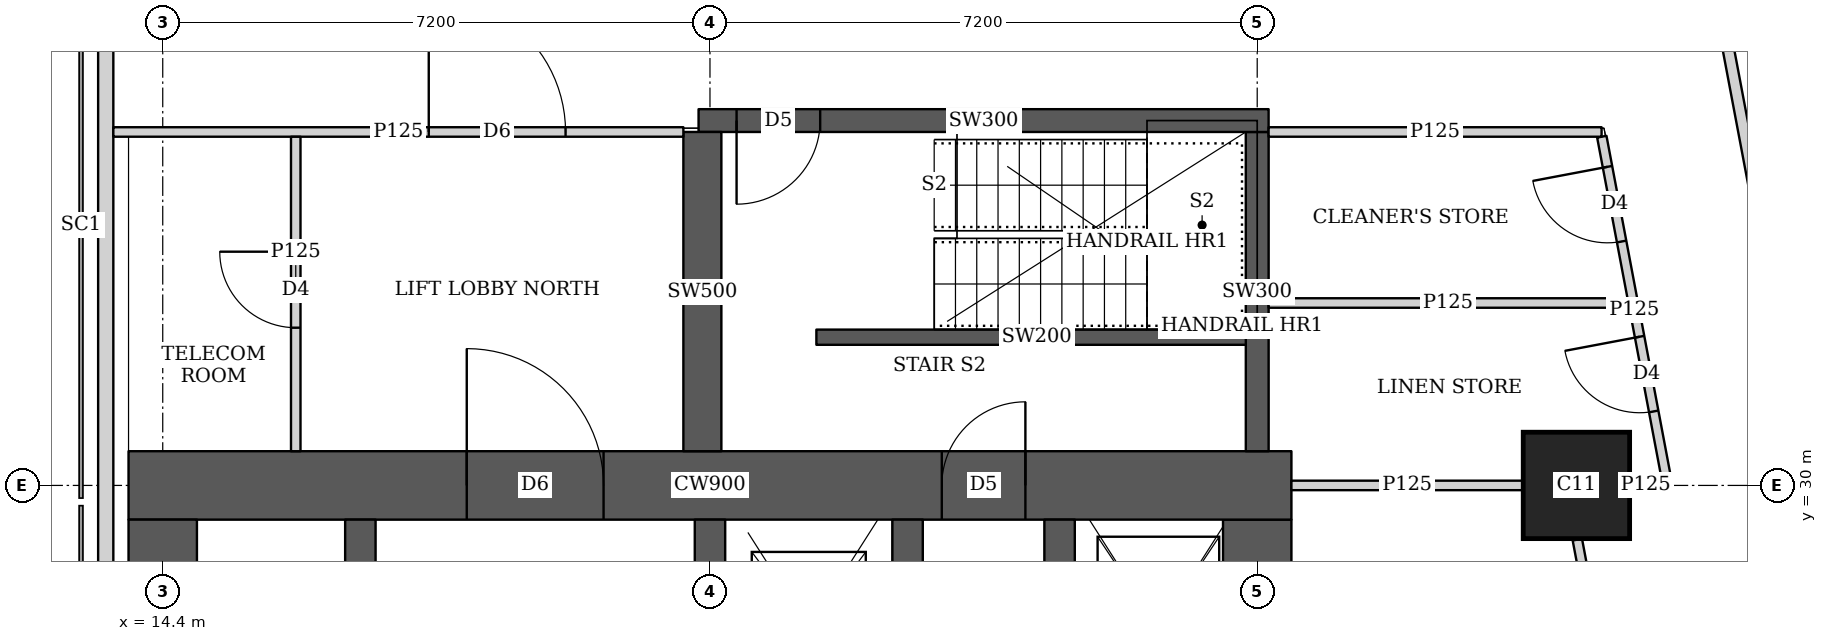
"""IFC4 building model, lengths in metres.
Left out: names, types, materials, properties, quantities, classifications, styles, units other than length and angle.
Written with IfcOpenShell. Run it as: python <this file> out.ifc"""

import sys

from ifc_helpers import new_model, si_unit, direction, frame, frame_2d, origin, origin_2d, place, context, subcontext, project, spatial, rectangle, extrude, element, fill, save


model = new_model("IFC4")
c1 = context("Model", 3, precision=1e-05, world=origin(), true_north=direction((0.0, 1.0)))
c2 = subcontext(c1, "Body", "Model", "MODEL_VIEW")
j1 = project(units=[si_unit("LENGTHUNIT", "METRE"), si_unit("PLANEANGLEUNIT", "RADIAN")], contexts=[c1])
p1 = place(None, origin())
s1 = spatial("IfcSite", under=j1, at=p1, CompositionType="ELEMENT")
p2 = place(p1, origin())
s2 = spatial("IfcBuilding", under=s1, at=p2, CompositionType="ELEMENT")
p3 = place(p2, frame((0.0, 0.0, 227.45)))
s3 = spatial("IfcBuildingStorey", under=s2, at=p3, CompositionType="ELEMENT", Elevation=227.45)
p4 = place(p3, frame((33.0, 30.0, 0.0), z_axis=(0.0, 0.0, 1.0), x_axis=(1.0, 0.0, 0.0)))
e1 = element("IfcColumn", 1, at=p4, inside=s3, PredefinedType="COLUMN", context=c2, shape_type="SweptSolid", body=[
    extrude(rectangle(XDim=1.4, YDim=1.4, at=origin_2d()), origin(), (0.0, 0.0, 1.0), 3.75),
])
p5 = place(p3, frame((13.95, 30.0, 0.0), z_axis=(0.0, 0.0, 1.0), x_axis=(1.0, 0.0, 0.0)))
e2 = element("IfcWall", 2, at=p5, inside=s3, PredefinedType="SHEAR", context=c2, shape_type="SweptSolid", body=[
    extrude(rectangle(XDim=15.3, YDim=0.9, at=frame_2d((7.65, 0.0))), origin(), (0.0, 0.0, 1.0), 3.75),
])
p6 = place(p5, frame((4.45, 0.0, 0.0)))
e3 = element("IfcOpeningElement", 3, at=p6, cuts=e2, PredefinedType="OPENING", context=c2, shape_type="SweptSolid", body=[
    extrude(rectangle(XDim=1.8, YDim=2.1, at=frame_2d((0.9, 1.05))), frame((0.0, 0.46, 0.0), z_axis=(0.0, -1.0, 0.0), x_axis=(1.0, 0.0, 0.0)), (0.0, 0.0, 1.0), 0.92),
])
p7 = place(p5, frame((10.7, 0.0, 0.0)))
e4 = element("IfcOpeningElement", 4, at=p7, cuts=e2, PredefinedType="OPENING", context=c2, shape_type="SweptSolid", body=[
    extrude(rectangle(XDim=1.1, YDim=2.1, at=frame_2d((0.55, 1.05))), frame((0.0, 0.46, 0.0), z_axis=(0.0, -1.0, 0.0), x_axis=(1.0, 0.0, 0.0)), (0.0, 0.0, 1.0), 0.92),
])
for number, where, z_axis, x_axis in (
    (5, (14.4, 15.45, 0.0), (0.0, 0.0, 1.0), (0.0, 1.0, 0.0)),
    (6, (28.8, 15.45, 0.0), (0.0, 0.0, 1.0), (0.0, 1.0, 0.0)),
):
    element("IfcWall", number, at=place(p3, frame(where, z_axis=z_axis, x_axis=x_axis)), inside=s3, PredefinedType="SHEAR", context=c2, shape_type="SweptSolid", body=[
        extrude(rectangle(XDim=14.1, YDim=0.9, at=frame_2d((7.05, 0.0))), origin(), (0.0, 0.0, 1.0), 3.75),
    ])
p8 = place(p3, frame((17.0, 15.45, 0.0), z_axis=(0.0, 0.0, 1.0), x_axis=(0.0, 1.0, 0.0)))
e7 = element("IfcWall", 7, at=p8, inside=s3, PredefinedType="SHEAR", context=c2, shape_type="SweptSolid", body=[
    extrude(rectangle(XDim=14.1, YDim=0.4, at=frame_2d((7.05, 0.0))), origin(), (0.0, 0.0, 1.0), 3.75),
])
p9 = place(p8, frame((1.05, 0.0, 0.0)))
e8 = element("IfcOpeningElement", 8, at=p9, cuts=e7, PredefinedType="OPENING", context=c2, shape_type="SweptSolid", body=[
    extrude(rectangle(XDim=1.0, YDim=2.1, at=frame_2d((0.5, 1.05))), frame((0.0, 0.21, 0.0), z_axis=(0.0, -1.0, 0.0), x_axis=(1.0, 0.0, 0.0)), (0.0, 0.0, 1.0), 0.42),
])
p10 = place(p8, frame((4.675, 0.0, 0.0)))
e9 = element("IfcOpeningElement", 9, at=p10, cuts=e7, PredefinedType="OPENING", context=c2, shape_type="SweptSolid", body=[
    extrude(rectangle(XDim=1.0, YDim=2.1, at=frame_2d((0.5, 1.05))), frame((0.0, 0.21, 0.0), z_axis=(0.0, -1.0, 0.0), x_axis=(1.0, 0.0, 0.0)), (0.0, 0.0, 1.0), 0.42),
])
p11 = place(p8, frame((8.425, 0.0, 0.0)))
e10 = element("IfcOpeningElement", 10, at=p11, cuts=e7, PredefinedType="OPENING", context=c2, shape_type="SweptSolid", body=[
    extrude(rectangle(XDim=1.0, YDim=2.1, at=frame_2d((0.5, 1.05))), frame((0.0, 0.21, 0.0), z_axis=(0.0, -1.0, 0.0), x_axis=(1.0, 0.0, 0.0)), (0.0, 0.0, 1.0), 0.42),
])
p12 = place(p8, frame((12.175, 0.0, 0.0)))
e11 = element("IfcOpeningElement", 11, at=p12, cuts=e7, PredefinedType="OPENING", context=c2, shape_type="SweptSolid", body=[
    extrude(rectangle(XDim=1.0, YDim=2.1, at=frame_2d((0.5, 1.05))), frame((0.0, 0.21, 0.0), z_axis=(0.0, -1.0, 0.0), x_axis=(1.0, 0.0, 0.0)), (0.0, 0.0, 1.0), 0.42),
])
p13 = place(p3, frame((21.6, 15.45, 0.0), z_axis=(0.0, 0.0, 1.0), x_axis=(0.0, 1.0, 0.0)))
e12 = element("IfcWall", 12, at=p13, inside=s3, PredefinedType="SHEAR", context=c2, shape_type="SweptSolid", body=[
    extrude(rectangle(XDim=14.1, YDim=0.4, at=frame_2d((7.05, 0.0))), origin(), (0.0, 0.0, 1.0), 3.75),
])
p14 = place(p13, frame((0.875, 0.0, 0.0)))
e13 = element("IfcOpeningElement", 13, at=p14, cuts=e12, PredefinedType="OPENING", context=c2, shape_type="SweptSolid", body=[
    extrude(rectangle(XDim=1.1, YDim=2.1, at=frame_2d((0.55, 1.05))), frame((0.0, 0.21, 0.0), z_axis=(0.0, -1.0, 0.0), x_axis=(1.0, 0.0, 0.0)), (0.0, 0.0, 1.0), 0.42),
])
p15 = place(p13, frame((4.625, 0.0, 0.0)))
e14 = element("IfcOpeningElement", 14, at=p15, cuts=e12, PredefinedType="OPENING", context=c2, shape_type="SweptSolid", body=[
    extrude(rectangle(XDim=1.1, YDim=2.1, at=frame_2d((0.55, 1.05))), frame((0.0, 0.21, 0.0), z_axis=(0.0, -1.0, 0.0), x_axis=(1.0, 0.0, 0.0)), (0.0, 0.0, 1.0), 0.42),
])
p16 = place(p13, frame((8.375, 0.0, 0.0)))
e15 = element("IfcOpeningElement", 15, at=p16, cuts=e12, PredefinedType="OPENING", context=c2, shape_type="SweptSolid", body=[
    extrude(rectangle(XDim=1.1, YDim=2.1, at=frame_2d((0.55, 1.05))), frame((0.0, 0.21, 0.0), z_axis=(0.0, -1.0, 0.0), x_axis=(1.0, 0.0, 0.0)), (0.0, 0.0, 1.0), 0.42),
])
p17 = place(p13, frame((12.125, 0.0, 0.0)))
e16 = element("IfcOpeningElement", 16, at=p17, cuts=e12, PredefinedType="OPENING", context=c2, shape_type="SweptSolid", body=[
    extrude(rectangle(XDim=1.1, YDim=2.1, at=frame_2d((0.55, 1.05))), frame((0.0, 0.21, 0.0), z_axis=(0.0, -1.0, 0.0), x_axis=(1.0, 0.0, 0.0)), (0.0, 0.0, 1.0), 0.42),
])
p18 = place(p3, frame((24.2, 15.45, 0.0), z_axis=(0.0, 0.0, 1.0), x_axis=(0.0, 1.0, 0.0)))
e17 = element("IfcWall", 17, at=p18, inside=s3, PredefinedType="SHEAR", context=c2, shape_type="SweptSolid", body=[
    extrude(rectangle(XDim=14.1, YDim=0.4, at=frame_2d((7.05, 0.0))), origin(), (0.0, 0.0, 1.0), 3.75),
])
p19 = place(p3, frame((26.2, 26.45, 0.0), z_axis=(0.0, 0.0, 1.0), x_axis=(0.0, 1.0, 0.0)))
e18 = element("IfcWall", 18, at=p19, inside=s3, PredefinedType="SHEAR", context=c2, shape_type="SweptSolid", body=[
    extrude(rectangle(XDim=3.1, YDim=0.4, at=frame_2d((1.55, 0.0))), origin(), (0.0, 0.0, 1.0), 3.75),
])
p20 = place(p19, frame((1.075, 0.0, 0.0)))
e19 = element("IfcOpeningElement", 19, at=p20, cuts=e18, PredefinedType="OPENING", context=c2, shape_type="SweptSolid", body=[
    extrude(rectangle(XDim=1.2, YDim=2.1, at=frame_2d((0.6, 1.05))), frame((0.0, 0.21, 0.0), z_axis=(0.0, -1.0, 0.0), x_axis=(1.0, 0.0, 0.0)), (0.0, 0.0, 1.0), 0.42),
])
p21 = place(p3, frame((21.45, 34.8, 0.0), z_axis=(0.0, 0.0, 1.0), x_axis=(1.0, 0.0, 0.0)))
e20 = element("IfcWall", 20, at=p21, inside=s3, PredefinedType="SHEAR", context=c2, shape_type="SweptSolid", body=[
    extrude(rectangle(XDim=7.5, YDim=0.3, at=frame_2d((3.75, 0.0))), origin(), (0.0, 0.0, 1.0), 3.75),
])
p22 = place(p21, frame((0.5, 0.0, 0.0)))
e21 = element("IfcOpeningElement", 21, at=p22, cuts=e20, PredefinedType="OPENING", context=c2, shape_type="SweptSolid", body=[
    extrude(rectangle(XDim=1.1, YDim=2.1, at=frame_2d((0.55, 1.05))), frame((0.0, 0.16, 0.0), z_axis=(0.0, -1.0, 0.0), x_axis=(1.0, 0.0, 0.0)), (0.0, 0.0, 1.0), 0.32),
])
p23 = place(p3, frame((21.5, 30.45, 0.0), z_axis=(0.0, 0.0, 1.0), x_axis=(0.0, 1.0, 0.0)))
e22 = element("IfcWall", 22, at=p23, inside=s3, PredefinedType="SHEAR", context=c2, shape_type="SweptSolid", body=[
    extrude(rectangle(XDim=4.2, YDim=0.5, at=frame_2d((2.1, 0.0))), origin(), (0.0, 0.0, 1.0), 3.75),
])
p24 = place(p3, frame((28.8, 30.45, 0.0), z_axis=(0.0, 0.0, 1.0), x_axis=(0.0, 1.0, 0.0)))
e23 = element("IfcWall", 23, at=p24, inside=s3, PredefinedType="SHEAR", context=c2, shape_type="SweptSolid", body=[
    extrude(rectangle(XDim=4.2, YDim=0.3, at=frame_2d((2.1, 0.0))), origin(), (0.0, 0.0, 1.0), 3.75),
])
p25 = place(p3, frame((13.65, 44.837, 0.0), z_axis=(0.0, 0.0, 1.0), x_axis=(0.0, -1.0, 0.0)))
e24 = element("IfcWall", 24, at=p25, inside=s3, PredefinedType="SOLIDWALL", context=c2, shape_type="SweptSolid", body=[
    extrude(rectangle(XDim=44.674, YDim=0.2, at=frame_2d((22.337, 0.0))), origin(), (0.0, 0.0, 1.0), 3.5),
])
p26 = place(p25, frame((2.614, 0.0, 0.9)))
e25 = element("IfcOpeningElement", 25, at=p26, cuts=e24, PredefinedType="OPENING", context=c2, shape_type="SweptSolid", body=[
    extrude(rectangle(XDim=2.4, YDim=1.5, at=frame_2d((1.2, 0.75))), frame((0.0, 0.11, 0.0), z_axis=(0.0, -1.0, 0.0), x_axis=(1.0, 0.0, 0.0)), (0.0, 0.0, 1.0), 0.22),
])
p27 = place(p25, frame((39.333, 0.0, 0.9)))
e26 = element("IfcOpeningElement", 26, at=p27, cuts=e24, PredefinedType="OPENING", context=c2, shape_type="SweptSolid", body=[
    extrude(rectangle(XDim=2.4, YDim=1.5, at=frame_2d((1.2, 0.75))), frame((0.0, 0.11, 0.0), z_axis=(0.0, -1.0, 0.0), x_axis=(1.0, 0.0, 0.0)), (0.0, 0.0, 1.0), 0.22),
])
p28 = place(p3, frame((33.68, 42.723, 0.0), z_axis=(0.0, 0.0, 1.0), x_axis=(0.185601160014, -0.982625162207, 0.0)))
e27 = element("IfcWall", 27, at=p28, inside=s3, PredefinedType="SOLIDWALL", context=c2, shape_type="SweptSolid", body=[
    extrude(rectangle(XDim=41.051, YDim=0.15, at=frame_2d((20.526, 0.0))), origin(), (0.0, 0.0, 1.0), 2.5),
])
p29 = place(p28, frame((16.123, 0.0, 0.0)))
e28 = element("IfcOpeningElement", 28, at=p29, cuts=e27, PredefinedType="OPENING", context=c2, shape_type="SweptSolid", body=[
    extrude(rectangle(XDim=1.0, YDim=2.1, at=frame_2d((0.5, 1.05))), frame((0.0, 0.085, 0.0), z_axis=(0.0, -1.0, 0.0), x_axis=(1.0, 0.0, 0.0)), (0.0, 0.0, 1.0), 0.17),
])
p30 = place(p28, frame((19.938, 0.0, 0.0)))
e29 = element("IfcOpeningElement", 29, at=p30, cuts=e27, PredefinedType="OPENING", context=c2, shape_type="SweptSolid", body=[
    extrude(rectangle(XDim=1.0, YDim=2.1, at=frame_2d((0.5, 1.05))), frame((0.0, 0.085, 0.0), z_axis=(0.0, -1.0, 0.0), x_axis=(1.0, 0.0, 0.0)), (0.0, 0.0, 1.0), 0.17),
])
p31 = place(p28, frame((30.902, 0.0, 0.0)))
e30 = element("IfcOpeningElement", 30, at=p31, cuts=e27, PredefinedType="OPENING", context=c2, shape_type="SweptSolid", body=[
    extrude(rectangle(XDim=1.0, YDim=2.1, at=frame_2d((0.5, 1.05))), frame((0.0, 0.085, 0.0), z_axis=(0.0, -1.0, 0.0), x_axis=(1.0, 0.0, 0.0)), (0.0, 0.0, 1.0), 0.17),
])
p32 = place(p3, frame((13.75, 34.65, 0.0), z_axis=(0.0, 0.0, 1.0), x_axis=(1.0, 0.0, 0.0)))
e31 = element("IfcWall", 31, at=p32, inside=s3, PredefinedType="PARTITIONING", context=c2, shape_type="SweptSolid", body=[
    extrude(rectangle(XDim=7.5, YDim=0.125, at=frame_2d((3.75, 0.0))), origin(), (0.0, 0.0, 1.0), 3.5),
])
p33 = place(p32, frame((4.15, 0.0, 0.0)))
e32 = element("IfcOpeningElement", 32, at=p33, cuts=e31, PredefinedType="OPENING", context=c2, shape_type="SweptSolid", body=[
    extrude(rectangle(XDim=1.8, YDim=2.1, at=frame_2d((0.9, 1.05))), frame((0.0, 0.073, 0.0), z_axis=(0.0, -1.0, 0.0), x_axis=(1.0, 0.0, 0.0)), (0.0, 0.0, 1.0), 0.145),
])
p34 = place(p3, frame((16.15, 30.45, 0.0), z_axis=(0.0, 0.0, 1.0), x_axis=(0.0, 1.0, 0.0)))
e33 = element("IfcWall", 33, at=p34, inside=s3, PredefinedType="PARTITIONING", context=c2, shape_type="SweptSolid", body=[
    extrude(rectangle(XDim=4.137, YDim=0.125, at=frame_2d((2.068, 0.0))), origin(), (0.0, 0.0, 1.0), 3.5),
])
p35 = place(p34, frame((1.625, 0.0, 0.0)))
e34 = element("IfcOpeningElement", 34, at=p35, cuts=e33, PredefinedType="OPENING", context=c2, shape_type="SweptSolid", body=[
    extrude(rectangle(XDim=1.0, YDim=2.1, at=frame_2d((0.5, 1.05))), frame((0.0, 0.073, 0.0), z_axis=(0.0, -1.0, 0.0), x_axis=(1.0, 0.0, 0.0)), (0.0, 0.0, 1.0), 0.145),
])
p36 = place(p3, frame((28.95, 34.65, 0.0), z_axis=(0.0, 0.0, 1.0), x_axis=(1.0, 0.0, 0.0)))
e35 = element("IfcWall", 35, at=p36, inside=s3, PredefinedType="PARTITIONING", context=c2, shape_type="SweptSolid", body=[
    extrude(rectangle(XDim=4.381, YDim=0.125, at=frame_2d((2.19, 0.0))), origin(), (0.0, 0.0, 1.0), 3.5),
])
p37 = place(p3, frame((34.193, 30.04, 0.0), z_axis=(0.0, 0.0, 1.0), x_axis=(-0.185626015863, 0.982620467034, 0.0)))
e36 = element("IfcWall", 36, at=p37, inside=s3, PredefinedType="PARTITIONING", context=c2, shape_type="SweptSolid", body=[
    extrude(rectangle(XDim=4.628, YDim=0.125, at=frame_2d((2.314, 0.0))), origin(), (0.0, 0.0, 1.0), 2.5),
])
p38 = place(p37, frame((0.95, 0.0, 0.0)))
e37 = element("IfcOpeningElement", 37, at=p38, cuts=e36, PredefinedType="OPENING", context=c2, shape_type="SweptSolid", body=[
    extrude(rectangle(XDim=1.0, YDim=2.1, at=frame_2d((0.5, 1.05))), frame((0.0, 0.073, 0.0), z_axis=(0.0, -1.0, 0.0), x_axis=(1.0, 0.0, 0.0)), (0.0, 0.0, 1.0), 0.145),
])
p39 = place(p37, frame((3.225, 0.0, 0.0)))
e38 = element("IfcOpeningElement", 38, at=p39, cuts=e36, PredefinedType="OPENING", context=c2, shape_type="SweptSolid", body=[
    extrude(rectangle(XDim=1.0, YDim=2.1, at=frame_2d((0.5, 1.05))), frame((0.0, 0.073, 0.0), z_axis=(0.0, -1.0, 0.0), x_axis=(1.0, 0.0, 0.0)), (0.0, 0.0, 1.0), 0.145),
])
p40 = place(p3, frame((35.576, 15.713, 0.0), z_axis=(0.0, 0.0, 1.0), x_axis=(-0.185602982696, 0.982624817931, 0.0)))
e39 = element("IfcWall", 39, at=p40, inside=s3, PredefinedType="PARTITIONING", context=c2, shape_type="SweptSolid", body=[
    extrude(rectangle(XDim=13.814, YDim=0.125, at=frame_2d((6.907, 0.0))), origin(), (0.0, 0.0, 1.0), 2.5),
])
p41 = place(p40, frame((5.3, 0.0, 0.0)))
e40 = element("IfcOpeningElement", 40, at=p41, cuts=e39, PredefinedType="OPENING", context=c2, shape_type="SweptSolid", body=[
    extrude(rectangle(XDim=1.0, YDim=2.1, at=frame_2d((0.5, 1.05))), frame((0.0, 0.073, 0.0), z_axis=(0.0, -1.0, 0.0), x_axis=(1.0, 0.0, 0.0)), (0.0, 0.0, 1.0), 0.145),
])
p42 = place(p3, frame((29.25, 30.0, 0.0), z_axis=(0.0, 0.0, 1.0), x_axis=(1.0, 0.0, 0.0)))
e41 = element("IfcWall", 41, at=p42, inside=s3, PredefinedType="PARTITIONING", context=c2, shape_type="SweptSolid", body=[
    extrude(rectangle(XDim=3.049, YDim=0.125, at=frame_2d((1.524, 0.0))), origin(), (0.0, 0.0, 1.0), 3.5),
])
p43 = place(p3, frame((33.701, 30.0, 0.0), z_axis=(0.0, 0.0, 1.0), x_axis=(1.0, 0.0, 0.0)))
e42 = element("IfcWall", 42, at=p43, inside=s3, PredefinedType="PARTITIONING", context=c2, shape_type="SweptSolid", body=[
    extrude(rectangle(XDim=0.424, YDim=0.125, at=frame_2d((0.212, 0.0))), origin(), (0.0, 0.0, 1.0), 2.5),
])
p44 = place(p3, frame((28.95, 32.4, 0.0), z_axis=(0.0, 0.0, 1.0), x_axis=(1.0, 0.0, 0.0)))
e43 = element("IfcWall", 43, at=p44, inside=s3, PredefinedType="PARTITIONING", context=c2, shape_type="SweptSolid", body=[
    extrude(rectangle(XDim=4.722, YDim=0.125, at=frame_2d((2.361, 0.0))), origin(), (0.0, 0.0, 1.0), 3.5),
])
p45 = place(p3, frame((23.0, 31.95, 0.0), z_axis=(0.0, 0.0, 1.0), x_axis=(1.0, 0.0, 0.0)))
e44 = element("IfcWall", 44, at=p45, inside=s3, PredefinedType="SHEAR", context=c2, shape_type="SweptSolid", body=[
    extrude(rectangle(XDim=5.8, YDim=0.2, at=frame_2d((2.9, 0.0))), origin(), (0.0, 0.0, 1.0), 3.75),
])
p46 = place(p35, origin())
e45 = element("IfcDoor", 45, at=p46, inside=s3, OperationType="SINGLE_SWING_RIGHT", PredefinedType="DOOR", context=c2, shape_type="SweptSolid", body=[
    extrude(rectangle(XDim=1.0, YDim=2.1, at=frame_2d((0.5, 1.05))), frame((0.0, 0.025, 0.0), z_axis=(0.0, -1.0, 0.0), x_axis=(1.0, 0.0, 0.0)), (0.0, 0.0, 1.0), 0.05),
])
fill(e34, e45)
p47 = place(p33, origin())
e46 = element("IfcDoor", 46, at=p47, inside=s3, OperationType="DOUBLE_DOOR_SINGLE_SWING", PredefinedType="DOOR", context=c2, shape_type="SweptSolid", body=[
    extrude(rectangle(XDim=1.8, YDim=2.1, at=frame_2d((0.9, 1.05))), frame((0.0, 0.025, 0.0), z_axis=(0.0, -1.0, 0.0), x_axis=(1.0, 0.0, 0.0)), (0.0, 0.0, 1.0), 0.05),
])
fill(e32, e46)
p48 = place(p38, origin())
e47 = element("IfcDoor", 47, at=p48, inside=s3, OperationType="SINGLE_SWING_RIGHT", PredefinedType="DOOR", context=c2, shape_type="SweptSolid", body=[
    extrude(rectangle(XDim=1.0, YDim=2.1, at=frame_2d((0.5, 1.05))), frame((0.0, 0.025, 0.0), z_axis=(0.0, -1.0, 0.0), x_axis=(1.0, 0.0, 0.0)), (0.0, 0.0, 1.0), 0.05),
])
fill(e37, e47)
p49 = place(p39, origin())
e48 = element("IfcDoor", 48, at=p49, inside=s3, OperationType="SINGLE_SWING_RIGHT", PredefinedType="DOOR", context=c2, shape_type="SweptSolid", body=[
    extrude(rectangle(XDim=1.0, YDim=2.1, at=frame_2d((0.5, 1.05))), frame((0.0, 0.025, 0.0), z_axis=(0.0, -1.0, 0.0), x_axis=(1.0, 0.0, 0.0)), (0.0, 0.0, 1.0), 0.05),
])
fill(e38, e48)
p50 = place(p6, origin())
e49 = element("IfcDoor", 49, at=p50, inside=s3, OperationType="DOUBLE_DOOR_SINGLE_SWING", PredefinedType="DOOR", context=c2, shape_type="SweptSolid", body=[
    extrude(rectangle(XDim=1.8, YDim=2.1, at=frame_2d((0.9, 1.05))), frame((0.0, 0.025, 0.0), z_axis=(0.0, -1.0, 0.0), x_axis=(1.0, 0.0, 0.0)), (0.0, 0.0, 1.0), 0.05),
])
fill(e3, e49)
p51 = place(p7, origin())
e50 = element("IfcDoor", 50, at=p51, inside=s3, OperationType="SINGLE_SWING_RIGHT", PredefinedType="DOOR", context=c2, shape_type="SweptSolid", body=[
    extrude(rectangle(XDim=1.1, YDim=2.1, at=frame_2d((0.55, 1.05))), frame((0.0, 0.025, 0.0), z_axis=(0.0, -1.0, 0.0), x_axis=(1.0, 0.0, 0.0)), (0.0, 0.0, 1.0), 0.05),
])
fill(e4, e50)
p52 = place(p22, origin())
e51 = element("IfcDoor", 51, at=p52, inside=s3, OperationType="SINGLE_SWING_RIGHT", PredefinedType="DOOR", context=c2, shape_type="SweptSolid", body=[
    extrude(rectangle(XDim=1.1, YDim=2.1, at=frame_2d((0.55, 1.05))), frame((0.0, 0.025, 0.0), z_axis=(0.0, -1.0, 0.0), x_axis=(1.0, 0.0, 0.0)), (0.0, 0.0, 1.0), 0.05),
])
fill(e21, e51)
save(model, sys.argv[1])
